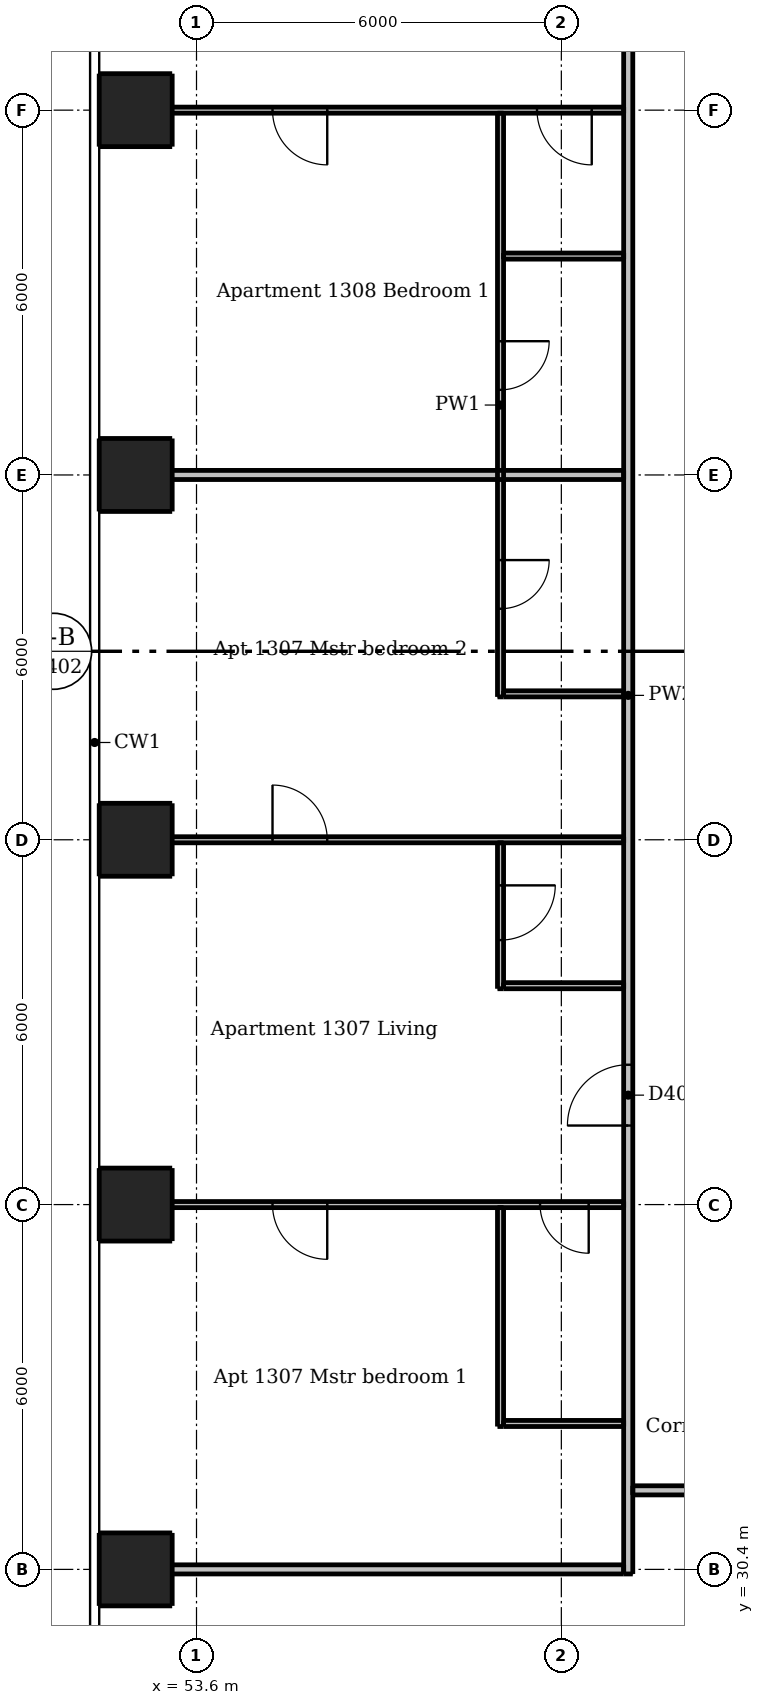
"""IFC4 building model, lengths in metres.
Left out: names, types, materials, properties, quantities, classifications, styles, units other than length and angle.
Written with IfcOpenShell. Run it as: python <this file> out.ifc"""

import sys

from ifc_helpers import new_model, si_unit, direction, frame, frame_2d, origin, origin_2d, place, context, subcontext, project, spatial, rectangle, extrude, element, fill, save


model = new_model("IFC4")
c1 = context("Model", 3, precision=1e-05, world=origin(), true_north=direction((0.0, 1.0)))
c2 = subcontext(c1, "Body", "Model", "MODEL_VIEW")
j1 = project(units=[si_unit("LENGTHUNIT", "METRE"), si_unit("PLANEANGLEUNIT", "RADIAN")], contexts=[c1])
p1 = place(None, origin())
s1 = spatial("IfcSite", under=j1, at=p1, CompositionType="ELEMENT")
p2 = place(p1, origin())
s2 = spatial("IfcBuilding", under=s1, at=p2, CompositionType="ELEMENT")
p3 = place(p2, frame((0.0, 0.0, 49.9)))
s3 = spatial("IfcBuildingStorey", under=s2, at=p3, CompositionType="ELEMENT", Elevation=49.9)
for number, where, z_axis, x_axis in (
    (1, (52.6, 30.4, 0.0), (0.0, 0.0, 1.0), (1.0, 0.0, 0.0)),
    (2, (52.6, 36.4, 0.0), (0.0, 0.0, 1.0), (1.0, 0.0, 0.0)),
    (3, (52.6, 42.4, 0.0), (0.0, 0.0, 1.0), (1.0, 0.0, 0.0)),
    (4, (52.6, 48.4, 0.0), (0.0, 0.0, 1.0), (1.0, 0.0, 0.0)),
    (5, (52.6, 54.4, 0.0), (0.0, 0.0, 1.0), (1.0, 0.0, 0.0)),
):
    element("IfcColumn", number, at=place(p3, frame(where, z_axis=z_axis, x_axis=x_axis)), inside=s3, PredefinedType="COLUMN", context=c2, shape_type="SweptSolid", body=[
        extrude(rectangle(XDim=1.2, YDim=1.2, at=origin_2d()), origin(), (0.0, 0.0, 1.0), 3.05),
    ])
p4 = place(p3, frame((58.6, 32.75, 0.0), z_axis=(0.0, 0.0, 1.0), x_axis=(0.0, 1.0, 0.0)))
e6 = element("IfcWall", 6, at=p4, inside=s3, PredefinedType="PARTITIONING", context=c2, shape_type="SweptSolid", body=[
    extrude(rectangle(XDim=3.6, YDim=0.1, at=frame_2d((1.8, 0.0))), origin(), (0.0, 0.0, 1.0), 3.05),
])
p5 = place(p3, frame((58.6, 42.35, 0.0), z_axis=(0.0, 0.0, 1.0), x_axis=(0.0, -1.0, 0.0)))
e7 = element("IfcWall", 7, at=p5, inside=s3, PredefinedType="PARTITIONING", context=c2, shape_type="SweptSolid", body=[
    extrude(rectangle(XDim=2.4, YDim=0.1, at=frame_2d((1.2, 0.0))), origin(), (0.0, 0.0, 1.0), 3.05),
])
p6 = place(p5, frame((0.7, 0.0, 0.0)))
e8 = element("IfcOpeningElement", 8, at=p6, cuts=e7, PredefinedType="OPENING", context=c2, shape_type="SweptSolid", body=[
    extrude(rectangle(XDim=0.9, YDim=2.1, at=frame_2d((0.45, 1.05))), frame((0.0, 0.06, 0.0), z_axis=(0.0, -1.0, 0.0), x_axis=(1.0, 0.0, 0.0)), (0.0, 0.0, 1.0), 0.12),
])
p7 = place(p3, frame((58.6, 54.35, 0.0), z_axis=(0.0, 0.0, 1.0), x_axis=(0.0, -1.0, 0.0)))
e9 = element("IfcWall", 9, at=p7, inside=s3, PredefinedType="PARTITIONING", context=c2, shape_type="SweptSolid", body=[
    extrude(rectangle(XDim=9.6, YDim=0.1, at=frame_2d((4.8, 0.0))), origin(), (0.0, 0.0, 1.0), 3.05),
])
p8 = place(p7, frame((7.35, 0.0, 0.0)))
e10 = element("IfcOpeningElement", 10, at=p8, cuts=e9, PredefinedType="OPENING", context=c2, shape_type="SweptSolid", body=[
    extrude(rectangle(XDim=0.8, YDim=2.1, at=frame_2d((0.4, 1.05))), frame((0.0, 0.06, 0.0), z_axis=(0.0, -1.0, 0.0), x_axis=(1.0, 0.0, 0.0)), (0.0, 0.0, 1.0), 0.12),
])
p9 = place(p7, frame((3.75, 0.0, 0.0)))
e11 = element("IfcOpeningElement", 11, at=p9, cuts=e9, PredefinedType="OPENING", context=c2, shape_type="SweptSolid", body=[
    extrude(rectangle(XDim=0.8, YDim=2.1, at=frame_2d((0.4, 1.05))), frame((0.0, 0.06, 0.0), z_axis=(0.0, -1.0, 0.0), x_axis=(1.0, 0.0, 0.0)), (0.0, 0.0, 1.0), 0.12),
])
p10 = place(p3, frame((60.625, 54.4, 0.0), z_axis=(0.0, 0.0, 1.0), x_axis=(-1.0, 0.0, 0.0)))
e12 = element("IfcWall", 12, at=p10, inside=s3, PredefinedType="PARTITIONING", context=c2, shape_type="SweptSolid", body=[
    extrude(rectangle(XDim=8.625, YDim=0.1, at=frame_2d((4.312, 0.0))), origin(), (0.0, 0.0, 1.0), 2.516),
])
p11 = place(p10, frame((0.525, 0.0, 0.0)))
e13 = element("IfcOpeningElement", 13, at=p11, cuts=e12, PredefinedType="OPENING", context=c2, shape_type="SweptSolid", body=[
    extrude(rectangle(XDim=0.9, YDim=2.1, at=frame_2d((0.45, 1.05))), frame((0.0, 0.06, 0.0), z_axis=(0.0, -1.0, 0.0), x_axis=(1.0, 0.0, 0.0)), (0.0, 0.0, 1.0), 0.12),
])
p12 = place(p10, frame((4.875, 0.0, 0.0)))
e14 = element("IfcOpeningElement", 14, at=p12, cuts=e12, PredefinedType="OPENING", context=c2, shape_type="SweptSolid", body=[
    extrude(rectangle(XDim=0.9, YDim=2.1, at=frame_2d((0.45, 1.05))), frame((0.0, 0.06, 0.0), z_axis=(0.0, -1.0, 0.0), x_axis=(1.0, 0.0, 0.0)), (0.0, 0.0, 1.0), 0.12),
])
for number, where, z_axis, x_axis in (
    (15, (58.65, 52.0, 0.0), (0.0, 0.0, 1.0), (1.0, 0.0, 0.0)),
    (16, (58.65, 44.8, 0.0), (0.0, 0.0, 1.0), (1.0, 0.0, 0.0)),
):
    element("IfcWall", number, at=place(p3, frame(where, z_axis=z_axis, x_axis=x_axis)), inside=s3, PredefinedType="PARTITIONING", context=c2, shape_type="SweptSolid", body=[
        extrude(rectangle(XDim=1.975, YDim=0.1, at=frame_2d((0.988, 0.0))), origin(), (0.0, 0.0, 1.0), 3.05),
    ])
p13 = place(p3, frame((52.0, 42.4, 0.0), z_axis=(0.0, 0.0, 1.0), x_axis=(1.0, 0.0, 0.0)))
e17 = element("IfcWall", 17, at=p13, inside=s3, PredefinedType="PARTITIONING", context=c2, shape_type="SweptSolid", body=[
    extrude(rectangle(XDim=8.625, YDim=0.1, at=frame_2d((4.312, 0.0))), origin(), (0.0, 0.0, 1.0), 2.516),
])
p14 = place(p13, frame((2.85, 0.0, 0.0)))
e18 = element("IfcOpeningElement", 18, at=p14, cuts=e17, PredefinedType="OPENING", context=c2, shape_type="SweptSolid", body=[
    extrude(rectangle(XDim=0.9, YDim=2.1, at=frame_2d((0.45, 1.05))), frame((0.0, 0.06, 0.0), z_axis=(0.0, -1.0, 0.0), x_axis=(1.0, 0.0, 0.0)), (0.0, 0.0, 1.0), 0.12),
])
p15 = place(p3, frame((58.65, 40.0, 0.0), z_axis=(0.0, 0.0, 1.0), x_axis=(1.0, 0.0, 0.0)))
e19 = element("IfcWall", 19, at=p15, inside=s3, PredefinedType="PARTITIONING", context=c2, shape_type="SweptSolid", body=[
    extrude(rectangle(XDim=1.975, YDim=0.1, at=frame_2d((0.988, 0.0))), origin(), (0.0, 0.0, 1.0), 3.05),
])
p16 = place(p3, frame((60.625, 36.4, 0.0), z_axis=(0.0, 0.0, 1.0), x_axis=(-1.0, 0.0, 0.0)))
e20 = element("IfcWall", 20, at=p16, inside=s3, PredefinedType="PARTITIONING", context=c2, shape_type="SweptSolid", body=[
    extrude(rectangle(XDim=8.625, YDim=0.1, at=frame_2d((4.312, 0.0))), origin(), (0.0, 0.0, 1.0), 2.516),
])
p17 = place(p16, frame((4.875, 0.0, 0.0)))
e21 = element("IfcOpeningElement", 21, at=p17, cuts=e20, PredefinedType="OPENING", context=c2, shape_type="SweptSolid", body=[
    extrude(rectangle(XDim=0.9, YDim=2.1, at=frame_2d((0.45, 1.05))), frame((0.0, 0.06, 0.0), z_axis=(0.0, -1.0, 0.0), x_axis=(1.0, 0.0, 0.0)), (0.0, 0.0, 1.0), 0.12),
])
p18 = place(p16, frame((0.575, 0.0, 0.0)))
e22 = element("IfcOpeningElement", 22, at=p18, cuts=e20, PredefinedType="OPENING", context=c2, shape_type="SweptSolid", body=[
    extrude(rectangle(XDim=0.8, YDim=2.1, at=frame_2d((0.4, 1.05))), frame((0.0, 0.06, 0.0), z_axis=(0.0, -1.0, 0.0), x_axis=(1.0, 0.0, 0.0)), (0.0, 0.0, 1.0), 0.12),
])
p19 = place(p3, frame((58.65, 32.8, 0.0), z_axis=(0.0, 0.0, 1.0), x_axis=(1.0, 0.0, 0.0)))
e23 = element("IfcWall", 23, at=p19, inside=s3, PredefinedType="PARTITIONING", context=c2, shape_type="SweptSolid", body=[
    extrude(rectangle(XDim=1.975, YDim=0.1, at=frame_2d((0.988, 0.0))), origin(), (0.0, 0.0, 1.0), 3.05),
])
p20 = place(p3, frame((60.7, 30.325, 0.0), z_axis=(0.0, 0.0, 1.0), x_axis=(0.0, 1.0, 0.0)))
e24 = element("IfcWall", 24, at=p20, inside=s3, PredefinedType="PARTITIONING", context=c2, shape_type="SweptSolid", body=[
    extrude(rectangle(XDim=28.9, YDim=0.15, at=frame_2d((14.45, 0.0))), origin(), (0.0, 0.0, 1.0), 3.05),
])
p21 = place(p20, frame((7.375, 0.0, 0.0)))
e25 = element("IfcOpeningElement", 25, at=p21, cuts=e24, PredefinedType="OPENING", context=c2, shape_type="SweptSolid", body=[
    extrude(rectangle(XDim=1.0, YDim=2.1, at=frame_2d((0.5, 1.05))), frame((0.0, 0.085, 0.0), z_axis=(0.0, -1.0, 0.0), x_axis=(1.0, 0.0, 0.0)), (0.0, 0.0, 1.0), 0.17),
])
p22 = place(p20, frame((26.025, 0.0, 0.0)))
e26 = element("IfcOpeningElement", 26, at=p22, cuts=e24, PredefinedType="OPENING", context=c2, shape_type="SweptSolid", body=[
    extrude(rectangle(XDim=1.0, YDim=2.1, at=frame_2d((0.5, 1.05))), frame((0.0, 0.085, 0.0), z_axis=(0.0, -1.0, 0.0), x_axis=(1.0, 0.0, 0.0)), (0.0, 0.0, 1.0), 0.17),
])
p23 = place(p3, frame((52.0, 48.4, 0.0), z_axis=(0.0, 0.0, 1.0), x_axis=(1.0, 0.0, 0.0)))
e27 = element("IfcWall", 27, at=p23, inside=s3, PredefinedType="PARTITIONING", context=c2, shape_type="SweptSolid", body=[
    extrude(rectangle(XDim=8.625, YDim=0.15, at=frame_2d((4.312, 0.0))), origin(), (0.0, 0.0, 1.0), 2.516),
])
p24 = place(p3, frame((89.525, 31.7, 0.0), z_axis=(0.0, 0.0, 1.0), x_axis=(-1.0, 0.0, 0.0)))
e28 = element("IfcWall", 28, at=p24, inside=s3, PredefinedType="PARTITIONING", context=c2, shape_type="SweptSolid", body=[
    extrude(rectangle(XDim=28.75, YDim=0.15, at=frame_2d((14.375, 0.0))), origin(), (0.0, 0.0, 1.0), 3.05),
])
p25 = place(p24, frame((24.325, 0.0, 0.0)))
e29 = element("IfcOpeningElement", 29, at=p25, cuts=e28, PredefinedType="OPENING", context=c2, shape_type="SweptSolid", body=[
    extrude(rectangle(XDim=1.0, YDim=2.1, at=frame_2d((0.5, 1.05))), frame((0.0, 0.085, 0.0), z_axis=(0.0, -1.0, 0.0), x_axis=(1.0, 0.0, 0.0)), (0.0, 0.0, 1.0), 0.17),
])
p26 = place(p24, frame((6.575, 0.0, 0.0)))
e30 = element("IfcOpeningElement", 30, at=p26, cuts=e28, PredefinedType="OPENING", context=c2, shape_type="SweptSolid", body=[
    extrude(rectangle(XDim=1.0, YDim=2.1, at=frame_2d((0.5, 1.05))), frame((0.0, 0.085, 0.0), z_axis=(0.0, -1.0, 0.0), x_axis=(1.0, 0.0, 0.0)), (0.0, 0.0, 1.0), 0.17),
])
p27 = place(p3, frame((52.0, 30.4, 0.0), z_axis=(0.0, 0.0, 1.0), x_axis=(1.0, 0.0, 0.0)))
e31 = element("IfcWall", 31, at=p27, inside=s3, PredefinedType="PARTITIONING", context=c2, shape_type="SweptSolid", body=[
    extrude(rectangle(XDim=8.625, YDim=0.15, at=frame_2d((4.312, 0.0))), origin(), (0.0, 0.0, 1.0), 2.647),
])
p28 = place(p21, origin())
e32 = element("IfcDoor", 32, at=p28, inside=s3, OperationType="SINGLE_SWING_LEFT", PredefinedType="DOOR", context=c2, shape_type="SweptSolid", body=[
    extrude(rectangle(XDim=1.0, YDim=2.1, at=frame_2d((0.5, 1.05))), frame((0.0, 0.025, 0.0), z_axis=(0.0, -1.0, 0.0), x_axis=(1.0, 0.0, 0.0)), (0.0, 0.0, 1.0), 0.05),
])
fill(e25, e32)
p29 = place(p6, origin())
e33 = element("IfcDoor", 33, at=p29, inside=s3, OperationType="SINGLE_SWING_LEFT", PredefinedType="DOOR", context=c2, shape_type="SweptSolid", body=[
    extrude(rectangle(XDim=0.9, YDim=2.1, at=frame_2d((0.45, 1.05))), frame((0.0, 0.025, 0.0), z_axis=(0.0, -1.0, 0.0), x_axis=(1.0, 0.0, 0.0)), (0.0, 0.0, 1.0), 0.05),
])
fill(e8, e33)
p30 = place(p17, origin())
e34 = element("IfcDoor", 34, at=p30, inside=s3, OperationType="SINGLE_SWING_LEFT", PredefinedType="DOOR", context=c2, shape_type="SweptSolid", body=[
    extrude(rectangle(XDim=0.9, YDim=2.1, at=frame_2d((0.45, 1.05))), frame((0.0, 0.025, 0.0), z_axis=(0.0, -1.0, 0.0), x_axis=(1.0, 0.0, 0.0)), (0.0, 0.0, 1.0), 0.05),
])
fill(e21, e34)
p31 = place(p18, origin())
e35 = element("IfcDoor", 35, at=p31, inside=s3, OperationType="SINGLE_SWING_LEFT", PredefinedType="DOOR", context=c2, shape_type="SweptSolid", body=[
    extrude(rectangle(XDim=0.8, YDim=2.1, at=frame_2d((0.4, 1.05))), frame((0.0, 0.025, 0.0), z_axis=(0.0, -1.0, 0.0), x_axis=(1.0, 0.0, 0.0)), (0.0, 0.0, 1.0), 0.05),
])
fill(e22, e35)
p32 = place(p14, origin())
e36 = element("IfcDoor", 36, at=p32, inside=s3, OperationType="SINGLE_SWING_LEFT", PredefinedType="DOOR", context=c2, shape_type="SweptSolid", body=[
    extrude(rectangle(XDim=0.9, YDim=2.1, at=frame_2d((0.45, 1.05))), frame((0.0, 0.025, 0.0), z_axis=(0.0, -1.0, 0.0), x_axis=(1.0, 0.0, 0.0)), (0.0, 0.0, 1.0), 0.05),
])
fill(e18, e36)
p33 = place(p8, origin())
e37 = element("IfcDoor", 37, at=p33, inside=s3, OperationType="SINGLE_SWING_LEFT", PredefinedType="DOOR", context=c2, shape_type="SweptSolid", body=[
    extrude(rectangle(XDim=0.8, YDim=2.1, at=frame_2d((0.4, 1.05))), frame((0.0, 0.025, 0.0), z_axis=(0.0, -1.0, 0.0), x_axis=(1.0, 0.0, 0.0)), (0.0, 0.0, 1.0), 0.05),
])
fill(e10, e37)
p34 = place(p11, origin())
e38 = element("IfcDoor", 38, at=p34, inside=s3, OperationType="SINGLE_SWING_LEFT", PredefinedType="DOOR", context=c2, shape_type="SweptSolid", body=[
    extrude(rectangle(XDim=0.9, YDim=2.1, at=frame_2d((0.45, 1.05))), frame((0.0, 0.025, 0.0), z_axis=(0.0, -1.0, 0.0), x_axis=(1.0, 0.0, 0.0)), (0.0, 0.0, 1.0), 0.05),
])
fill(e13, e38)
p35 = place(p12, origin())
e39 = element("IfcDoor", 39, at=p35, inside=s3, OperationType="SINGLE_SWING_LEFT", PredefinedType="DOOR", context=c2, shape_type="SweptSolid", body=[
    extrude(rectangle(XDim=0.9, YDim=2.1, at=frame_2d((0.45, 1.05))), frame((0.0, 0.025, 0.0), z_axis=(0.0, -1.0, 0.0), x_axis=(1.0, 0.0, 0.0)), (0.0, 0.0, 1.0), 0.05),
])
fill(e14, e39)
p36 = place(p9, origin())
e40 = element("IfcDoor", 40, at=p36, inside=s3, OperationType="SINGLE_SWING_LEFT", PredefinedType="DOOR", context=c2, shape_type="SweptSolid", body=[
    extrude(rectangle(XDim=0.8, YDim=2.1, at=frame_2d((0.4, 1.05))), frame((0.0, 0.025, 0.0), z_axis=(0.0, -1.0, 0.0), x_axis=(1.0, 0.0, 0.0)), (0.0, 0.0, 1.0), 0.05),
])
fill(e11, e40)
save(model, sys.argv[1])
